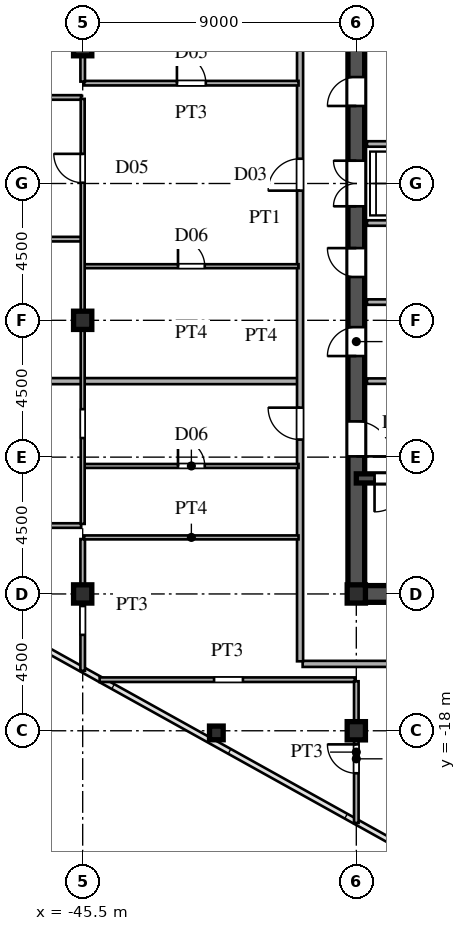
"""IFC4 building model, lengths in metres.
Left out: names, types, materials, properties, quantities, classifications, styles, units other than length and angle.
Written with IfcOpenShell. Run it as: python <this file> out.ifc"""

import sys

from ifc_helpers import new_model, si_unit, direction, frame, frame_2d, origin, origin_2d, place, context, subcontext, project, spatial, rectangle, hollow_rectangle, i_section, extrude, source, transform, mapped, element, fill, save


model = new_model("IFC4")
c1 = context("Model", 3, precision=1e-05, world=origin(), true_north=direction((0.0, 1.0)))
c2 = subcontext(c1, "Body", "Model", "MODEL_VIEW")
j1 = project(units=[si_unit("LENGTHUNIT", "METRE"), si_unit("PLANEANGLEUNIT", "RADIAN")], contexts=[c1])
p1 = place(None, origin())
s1 = spatial("IfcSite", under=j1, at=p1, CompositionType="ELEMENT")
p2 = place(p1, origin())
s2 = spatial("IfcBuilding", under=s1, at=p2, CompositionType="ELEMENT")
p3 = place(p2, frame((0.0, 0.0, 177.9)))
s3 = spatial("IfcBuildingStorey", under=s2, at=p3, CompositionType="ELEMENT", Elevation=177.9)
m1 = source(origin(), c2, "Body", "SweptSolid", [
    extrude(i_section(OverallWidth=0.6, OverallDepth=0.6, WebThickness=0.025, FlangeThickness=0.04, at=origin_2d()), origin(), (0.0, 0.0, 1.0), 3.6),
])
for number, where, z_axis, x_axis in (
    (1, (-36.5, -18.0, 0.0), (0.0, 0.0, 1.0), (1.0, 0.0, 0.0)),
    (2, (-36.5, -13.5, 0.0), (0.0, 0.0, 1.0), (1.0, 0.0, 0.0)),
    (3, (-45.5, -13.5, 0.0), (0.0, 0.0, 1.0), (1.0, 0.0, 0.0)),
    (4, (-45.5, -4.5, 0.0), (0.0, 0.0, 1.0), (1.0, 0.0, 0.0)),
    (5, (-45.5, 4.5, 0.0), (0.0, 0.0, 1.0), (1.0, 0.0, 0.0)),
):
    element("IfcColumn", number, at=place(p3, frame(where, z_axis=z_axis, x_axis=x_axis)), inside=s3, PredefinedType="COLUMN", context=c2, shape_type="MappedRepresentation", body=[
        mapped(m1, transform((0.0, 0.0, 0.0), scale=1.0)),
    ])
m2 = source(origin(), c2, "Body", "SweptSolid", [
    extrude(hollow_rectangle(XDim=0.45, YDim=0.45, WallThickness=0.018, at=origin_2d()), origin(), (0.0, 0.0, 1.0), 3.6),
])
p4 = place(p3, frame((-41.104, -18.071, 0.0), z_axis=(0.0, 0.0, 1.0), x_axis=(1.0, 0.0, 0.0)))
e6 = element("IfcColumn", 6, at=p4, inside=s3, PredefinedType="COLUMN", context=c2, shape_type="MappedRepresentation", body=[
    mapped(m2, transform((0.0, 0.0, 0.0), scale=1.0)),
])
p5 = place(p3, frame((-36.5, -13.5, 0.0), z_axis=(0.0, 0.0, 1.0), x_axis=(1.0, 0.0, 0.0)))
e7 = element("IfcWall", 7, at=p5, inside=s3, PredefinedType="SHEAR", context=c2, shape_type="SweptSolid", body=[
    extrude(rectangle(XDim=9.0, YDim=0.55, at=frame_2d((4.5, 0.0))), origin(), (0.0, 0.0, 1.0), 3.38),
])
p6 = place(p3, frame((-36.5, -13.65, 0.0), z_axis=(0.0, 0.0, 1.0), x_axis=(0.0, 1.0, 0.0)))
e8 = element("IfcWall", 8, at=p6, inside=s3, PredefinedType="SHEAR", context=c2, shape_type="SweptSolid", body=[
    extrude(rectangle(XDim=7.15, YDim=0.55, at=frame_2d((3.575, 0.0))), origin(), (0.0, 0.0, 1.0), 3.38),
])
p7 = place(p6, frame((4.675, 0.0, 0.0)))
e9 = element("IfcOpeningElement", 9, at=p7, cuts=e8, PredefinedType="OPENING", context=c2, shape_type="SweptSolid", body=[
    extrude(rectangle(XDim=1.15, YDim=2.2, at=frame_2d((0.575, 1.1))), frame((0.0, 0.285, 0.0), z_axis=(0.0, -1.0, 0.0), x_axis=(1.0, 0.0, 0.0)), (0.0, 0.0, 1.0), 0.57),
])
p8 = place(p3, frame((-36.5, -1.3, 0.0), z_axis=(0.0, 0.0, 1.0), x_axis=(0.0, 1.0, 0.0)))
e10 = element("IfcWall", 10, at=p8, inside=s3, PredefinedType="SHEAR", context=c2, shape_type="SweptSolid", body=[
    extrude(rectangle(XDim=2.6, YDim=0.55, at=frame_2d((1.3, 0.0))), origin(), (0.0, 0.0, 1.0), 3.38),
])
p9 = place(p8, frame((0.55, 0.0, 0.0)))
e11 = element("IfcOpeningElement", 11, at=p9, cuts=e10, PredefinedType="OPENING", context=c2, shape_type="SweptSolid", body=[
    extrude(rectangle(XDim=1.5, YDim=2.3, at=frame_2d((0.75, 1.15))), frame((0.0, 0.285, 0.0), z_axis=(0.0, -1.0, 0.0), x_axis=(1.0, 0.0, 0.0)), (0.0, 0.0, 1.0), 0.57),
])
p10 = place(p3, frame((-36.5, -6.5, 0.0), z_axis=(0.0, 0.0, 1.0), x_axis=(0.0, 1.0, 0.0)))
e12 = element("IfcWall", 12, at=p10, inside=s3, PredefinedType="SHEAR", context=c2, shape_type="SweptSolid", body=[
    extrude(rectangle(XDim=2.6, YDim=0.55, at=frame_2d((1.3, 0.0))), origin(), (0.0, 0.0, 1.0), 3.38),
])
p11 = place(p10, frame((0.825, 0.0, 0.0)))
e13 = element("IfcOpeningElement", 13, at=p11, cuts=e12, PredefinedType="OPENING", context=c2, shape_type="SweptSolid", body=[
    extrude(rectangle(XDim=0.95, YDim=2.15, at=frame_2d((0.475, 1.075))), frame((0.0, 0.285, 0.0), z_axis=(0.0, -1.0, 0.0), x_axis=(1.0, 0.0, 0.0)), (0.0, 0.0, 1.0), 0.57),
])
p12 = place(p3, frame((-36.5, -3.9, 0.0), z_axis=(0.0, 0.0, 1.0), x_axis=(0.0, 1.0, 0.0)))
e14 = element("IfcWall", 14, at=p12, inside=s3, PredefinedType="SHEAR", context=c2, shape_type="SweptSolid", body=[
    extrude(rectangle(XDim=2.6, YDim=0.55, at=frame_2d((1.3, 0.0))), origin(), (0.0, 0.0, 1.0), 3.38),
])
p13 = place(p12, frame((0.825, 0.0, 0.0)))
e15 = element("IfcOpeningElement", 15, at=p13, cuts=e14, PredefinedType="OPENING", context=c2, shape_type="SweptSolid", body=[
    extrude(rectangle(XDim=0.95, YDim=2.15, at=frame_2d((0.475, 1.075))), frame((0.0, 0.285, 0.0), z_axis=(0.0, -1.0, 0.0), x_axis=(1.0, 0.0, 0.0)), (0.0, 0.0, 1.0), 0.57),
])
p14 = place(p3, frame((-36.5, 1.3, 0.0), z_axis=(0.0, 0.0, 1.0), x_axis=(0.0, 1.0, 0.0)))
e16 = element("IfcWall", 16, at=p14, inside=s3, PredefinedType="SHEAR", context=c2, shape_type="SweptSolid", body=[
    extrude(rectangle(XDim=3.45, YDim=0.55, at=frame_2d((1.725, 0.0))), origin(), (0.0, 0.0, 1.0), 3.38),
])
p15 = place(p14, frame((1.25, 0.0, 0.0)))
e17 = element("IfcOpeningElement", 17, at=p15, cuts=e16, PredefinedType="OPENING", context=c2, shape_type="SweptSolid", body=[
    extrude(rectangle(XDim=0.95, YDim=2.15, at=frame_2d((0.475, 1.075))), frame((0.0, 0.285, 0.0), z_axis=(0.0, -1.0, 0.0), x_axis=(1.0, 0.0, 0.0)), (0.0, 0.0, 1.0), 0.57),
])
p16 = place(p3, frame((-36.5, -9.7, 0.0), z_axis=(0.0, 0.0, 1.0), x_axis=(1.0, 0.0, 0.0)))
e18 = element("IfcWall", 18, at=p16, inside=s3, PredefinedType="SHEAR", context=c2, shape_type="SweptSolid", body=[
    extrude(rectangle(XDim=9.0, YDim=0.3, at=frame_2d((4.5, 0.0))), origin(), (0.0, 0.0, 1.0), 3.38),
])
p17 = place(p16, frame((0.6, 0.0, 0.0)))
e19 = element("IfcOpeningElement", 19, at=p17, cuts=e18, PredefinedType="OPENING", context=c2, shape_type="SweptSolid", body=[
    extrude(rectangle(XDim=1.1, YDim=2.2, at=frame_2d((0.55, 1.1))), frame((0.0, 0.16, 0.0), z_axis=(0.0, -1.0, 0.0), x_axis=(1.0, 0.0, 0.0)), (0.0, 0.0, 1.0), 0.32),
])
p18 = place(p3, frame((-36.15, -6.5, 0.0), z_axis=(0.0, 0.0, 1.0), x_axis=(1.0, 0.0, 0.0)))
e20 = element("IfcWall", 20, at=p18, inside=s3, PredefinedType="PARTITIONING", context=c2, shape_type="SweptSolid", body=[
    extrude(rectangle(XDim=5.7, YDim=0.18, at=frame_2d((2.85, 0.0))), origin(), (0.0, 0.0, 1.0), 3.38),
])
for number, where, z_axis, x_axis in (
    (21, (-36.15, -1.3, 0.0), (0.0, 0.0, 1.0), (1.0, 0.0, 0.0)),
    (22, (-36.15, 1.3, 0.0), (0.0, 0.0, 1.0), (1.0, 0.0, 0.0)),
    (23, (-36.15, -3.9, 0.0), (0.0, 0.0, 1.0), (1.0, 0.0, 0.0)),
):
    element("IfcWall", number, at=place(p3, frame(where, z_axis=z_axis, x_axis=x_axis)), inside=s3, PredefinedType="PARTITIONING", context=c2, shape_type="SweptSolid", body=[
        extrude(rectangle(XDim=2.95, YDim=0.18, at=frame_2d((1.475, 0.0))), origin(), (0.0, 0.0, 1.0), 3.38),
    ])
p19 = place(p3, frame((-44.943, -16.32, 0.0), z_axis=(0.0, 0.0, 1.0), x_axis=(1.0, 0.0, 0.0)))
e24 = element("IfcWall", 24, at=p19, inside=s3, PredefinedType="PARTITIONING", context=c2, shape_type="SweptSolid", body=[
    extrude(rectangle(XDim=8.393, YDim=0.15, at=frame_2d((4.197, 0.0))), origin(), (0.0, 0.0, 1.0), 3.38),
])
p20 = place(p19, frame((3.764, 0.0, 0.0)))
e25 = element("IfcOpeningElement", 25, at=p20, cuts=e24, PredefinedType="OPENING", context=c2, shape_type="SweptSolid", body=[
    extrude(rectangle(XDim=0.95, YDim=2.15, at=frame_2d((0.475, 1.075))), frame((0.0, 0.085, 0.0), z_axis=(0.0, -1.0, 0.0), x_axis=(1.0, 0.0, 0.0)), (0.0, 0.0, 1.0), 0.17),
])
p21 = place(p3, frame((-38.265, -15.8, 0.0), z_axis=(0.0, 0.0, 1.0), x_axis=(1.0, 0.0, 0.0)))
e26 = element("IfcWall", 26, at=p21, inside=s3, PredefinedType="PARTITIONING", context=c2, shape_type="SweptSolid", body=[
    extrude(rectangle(XDim=10.765, YDim=0.2, at=frame_2d((5.382, 0.0))), origin(), (0.0, 0.0, 1.0), 3.38),
])
p22 = place(p3, frame((-45.45, -11.64, 0.0), z_axis=(0.0, 0.0, 1.0), x_axis=(1.0, 0.0, 0.0)))
e27 = element("IfcWall", 27, at=p22, inside=s3, PredefinedType="PARTITIONING", context=c2, shape_type="SweptSolid", body=[
    extrude(rectangle(XDim=7.05, YDim=0.13, at=frame_2d((3.525, 0.0))), origin(), (0.0, 0.0, 1.0), 3.38),
])
p23 = place(p3, frame((-53.983, -11.25, 0.0), z_axis=(0.0, 0.0, 1.0), x_axis=(1.0, 0.0, 0.0)))
e28 = element("IfcWall", 28, at=p23, inside=s3, PredefinedType="PARTITIONING", context=c2, shape_type="SweptSolid", body=[
    extrude(rectangle(XDim=8.433, YDim=0.15, at=frame_2d((4.216, 0.0))), origin(), (0.0, 0.0, 1.0), 3.38),
])
p24 = place(p23, frame((3.741, 0.0, 0.0)))
e29 = element("IfcOpeningElement", 29, at=p24, cuts=e28, PredefinedType="OPENING", context=c2, shape_type="SweptSolid", body=[
    extrude(rectangle(XDim=0.95, YDim=2.15, at=frame_2d((0.475, 1.075))), frame((0.0, 0.085, 0.0), z_axis=(0.0, -1.0, 0.0), x_axis=(1.0, 0.0, 0.0)), (0.0, 0.0, 1.0), 0.17),
])
p25 = place(p3, frame((-45.45, -9.29, 0.0), z_axis=(0.0, 0.0, 1.0), x_axis=(1.0, 0.0, 0.0)))
e30 = element("IfcWall", 30, at=p25, inside=s3, PredefinedType="PARTITIONING", context=c2, shape_type="SweptSolid", body=[
    extrude(rectangle(XDim=7.05, YDim=0.13, at=frame_2d((3.525, 0.0))), origin(), (0.0, 0.0, 1.0), 3.38),
])
p26 = place(p25, frame((3.085, 0.0, 0.0)))
e31 = element("IfcOpeningElement", 31, at=p26, cuts=e30, PredefinedType="OPENING", context=c2, shape_type="SweptSolid", body=[
    extrude(rectangle(XDim=0.88, YDim=2.1, at=frame_2d((0.44, 1.05))), frame((0.0, 0.075, 0.0), z_axis=(0.0, -1.0, 0.0), x_axis=(1.0, 0.0, 0.0)), (0.0, 0.0, 1.0), 0.15),
])
p27 = place(p3, frame((-62.577, -6.5, 0.0), z_axis=(0.0, 0.0, 1.0), x_axis=(1.0, 0.0, 0.0)))
e32 = element("IfcWall", 32, at=p27, inside=s3, PredefinedType="PARTITIONING", context=c2, shape_type="SweptSolid", body=[
    extrude(rectangle(XDim=24.147, YDim=0.2, at=frame_2d((12.073, 0.0))), origin(), (0.0, 0.0, 1.0), 3.38),
])
p28 = place(p3, frame((-45.45, -2.72, 0.0), z_axis=(0.0, 0.0, 1.0), x_axis=(1.0, 0.0, 0.0)))
e33 = element("IfcWall", 33, at=p28, inside=s3, PredefinedType="PARTITIONING", context=c2, shape_type="SweptSolid", body=[
    extrude(rectangle(XDim=7.05, YDim=0.13, at=frame_2d((3.525, 0.0))), origin(), (0.0, 0.0, 1.0), 3.38),
])
p29 = place(p28, frame((3.085, 0.0, 0.0)))
e34 = element("IfcOpeningElement", 34, at=p29, cuts=e33, PredefinedType="OPENING", context=c2, shape_type="SweptSolid", body=[
    extrude(rectangle(XDim=0.88, YDim=2.1, at=frame_2d((0.44, 1.05))), frame((0.0, 0.075, 0.0), z_axis=(0.0, -1.0, 0.0), x_axis=(1.0, 0.0, 0.0)), (0.0, 0.0, 1.0), 0.15),
])
p30 = place(p3, frame((-68.535, -1.83, 0.0), z_axis=(0.0, 0.0, 1.0), x_axis=(1.0, 0.0, 0.0)))
e35 = element("IfcWall", 35, at=p30, inside=s3, PredefinedType="PARTITIONING", context=c2, shape_type="SweptSolid", body=[
    extrude(rectangle(XDim=22.985, YDim=0.15, at=frame_2d((11.492, 0.0))), origin(), (0.0, 0.0, 1.0), 3.38),
])
p31 = place(p30, frame((18.06, 0.0, 0.0)))
e36 = element("IfcOpeningElement", 36, at=p31, cuts=e35, PredefinedType="OPENING", context=c2, shape_type="SweptSolid", body=[
    extrude(rectangle(XDim=0.95, YDim=2.15, at=frame_2d((0.475, 1.075))), frame((0.0, 0.085, 0.0), z_axis=(0.0, -1.0, 0.0), x_axis=(1.0, 0.0, 0.0)), (0.0, 0.0, 1.0), 0.17),
])
p32 = place(p30, frame((10.71, 0.0, 0.0)))
e37 = element("IfcOpeningElement", 37, at=p32, cuts=e35, PredefinedType="OPENING", context=c2, shape_type="SweptSolid", body=[
    extrude(rectangle(XDim=0.95, YDim=2.15, at=frame_2d((0.475, 1.075))), frame((0.0, 0.085, 0.0), z_axis=(0.0, -1.0, 0.0), x_axis=(1.0, 0.0, 0.0)), (0.0, 0.0, 1.0), 0.17),
])
p33 = place(p3, frame((-68.375, 2.83, 0.0), z_axis=(0.0, 0.0, 1.0), x_axis=(1.0, 0.0, 0.0)))
e38 = element("IfcWall", 38, at=p33, inside=s3, PredefinedType="PARTITIONING", context=c2, shape_type="SweptSolid", body=[
    extrude(rectangle(XDim=22.825, YDim=0.15, at=frame_2d((11.413, 0.0))), origin(), (0.0, 0.0, 1.0), 3.38),
])
p34 = place(p33, frame((17.9, 0.0, 0.0)))
e39 = element("IfcOpeningElement", 39, at=p34, cuts=e38, PredefinedType="OPENING", context=c2, shape_type="SweptSolid", body=[
    extrude(rectangle(XDim=0.95, YDim=2.15, at=frame_2d((0.475, 1.075))), frame((0.0, 0.085, 0.0), z_axis=(0.0, -1.0, 0.0), x_axis=(1.0, 0.0, 0.0)), (0.0, 0.0, 1.0), 0.17),
])
p35 = place(p33, frame((10.55, 0.0, 0.0)))
e40 = element("IfcOpeningElement", 40, at=p35, cuts=e38, PredefinedType="OPENING", context=c2, shape_type="SweptSolid", body=[
    extrude(rectangle(XDim=0.95, YDim=2.15, at=frame_2d((0.475, 1.075))), frame((0.0, 0.085, 0.0), z_axis=(0.0, -1.0, 0.0), x_axis=(1.0, 0.0, 0.0)), (0.0, 0.0, 1.0), 0.17),
])
p36 = place(p3, frame((-45.45, 3.3, 0.0), z_axis=(0.0, 0.0, 1.0), x_axis=(1.0, 0.0, 0.0)))
e41 = element("IfcWall", 41, at=p36, inside=s3, PredefinedType="PARTITIONING", context=c2, shape_type="SweptSolid", body=[
    extrude(rectangle(XDim=7.05, YDim=0.15, at=frame_2d((3.525, 0.0))), origin(), (0.0, 0.0, 1.0), 3.38),
])
p37 = place(p36, frame((3.05, 0.0, 0.0)))
e42 = element("IfcOpeningElement", 42, at=p37, cuts=e41, PredefinedType="OPENING", context=c2, shape_type="SweptSolid", body=[
    extrude(rectangle(XDim=0.95, YDim=2.15, at=frame_2d((0.475, 1.075))), frame((0.0, 0.085, 0.0), z_axis=(0.0, -1.0, 0.0), x_axis=(1.0, 0.0, 0.0)), (0.0, 0.0, 1.0), 0.17),
])
p38 = place(p3, frame((-45.5, -16.027, 0.0), z_axis=(0.0, 0.0, 1.0), x_axis=(0.0, 1.0, 0.0)))
e43 = element("IfcWall", 43, at=p38, inside=s3, PredefinedType="PARTITIONING", context=c2, shape_type="SweptSolid", body=[
    extrude(rectangle(XDim=4.332, YDim=0.15, at=frame_2d((2.166, 0.0))), origin(), (0.0, 0.0, 1.0), 2.78),
])
p39 = place(p38, frame((1.181, 0.0, 0.0)))
e44 = element("IfcOpeningElement", 44, at=p39, cuts=e43, PredefinedType="OPENING", context=c2, shape_type="SweptSolid", body=[
    extrude(rectangle(XDim=0.95, YDim=2.15, at=frame_2d((0.475, 1.075))), frame((0.0, 0.085, 0.0), z_axis=(0.0, -1.0, 0.0), x_axis=(1.0, 0.0, 0.0)), (0.0, 0.0, 1.0), 0.17),
])
p40 = place(p3, frame((-45.5, -11.196, 0.0), z_axis=(0.0, 0.0, 1.0), x_axis=(0.0, 1.0, 0.0)))
e45 = element("IfcWall", 45, at=p40, inside=s3, PredefinedType="PARTITIONING", context=c2, shape_type="SweptSolid", body=[
    extrude(rectangle(XDim=13.979, YDim=0.13, at=frame_2d((6.99, 0.0))), origin(), (0.0, 0.0, 1.0), 2.78),
])
p41 = place(p40, frame((2.823, 0.0, 0.0)))
e46 = element("IfcOpeningElement", 46, at=p41, cuts=e45, PredefinedType="OPENING", context=c2, shape_type="SweptSolid", body=[
    extrude(rectangle(XDim=0.95, YDim=2.15, at=frame_2d((0.475, 1.075))), frame((0.0, 0.075, 0.0), z_axis=(0.0, -1.0, 0.0), x_axis=(1.0, 0.0, 0.0)), (0.0, 0.0, 1.0), 0.15),
])
p42 = place(p40, frame((11.221, 0.0, 0.0)))
e47 = element("IfcOpeningElement", 47, at=p42, cuts=e45, PredefinedType="OPENING", context=c2, shape_type="SweptSolid", body=[
    extrude(rectangle(XDim=0.95, YDim=2.15, at=frame_2d((0.475, 1.075))), frame((0.0, 0.075, 0.0), z_axis=(0.0, -1.0, 0.0), x_axis=(1.0, 0.0, 0.0)), (0.0, 0.0, 1.0), 0.15),
])
p43 = place(p3, frame((-45.5, 3.352, 0.0), z_axis=(0.0, 0.0, 1.0), x_axis=(0.0, 1.0, 0.0)))
e48 = element("IfcWall", 48, at=p43, inside=s3, PredefinedType="PARTITIONING", context=c2, shape_type="SweptSolid", body=[
    extrude(rectangle(XDim=4.098, YDim=0.15, at=frame_2d((2.049, 0.0))), origin(), (0.0, 0.0, 1.0), 2.78),
])
p44 = place(p3, frame((-38.35, -15.715, 0.0), z_axis=(0.0, 0.0, 1.0), x_axis=(0.0, 1.0, 0.0)))
e49 = element("IfcWall", 49, at=p44, inside=s3, PredefinedType="PARTITIONING", context=c2, shape_type="SweptSolid", body=[
    extrude(rectangle(XDim=31.43, YDim=0.2, at=frame_2d((15.715, 0.0))), origin(), (0.0, 0.0, 1.0), 3.38),
])
p45 = place(p44, frame((7.292, 0.0, 0.0)))
e50 = element("IfcOpeningElement", 50, at=p45, cuts=e49, PredefinedType="OPENING", context=c2, shape_type="SweptSolid", body=[
    extrude(rectangle(XDim=1.05, YDim=2.25, at=frame_2d((0.525, 1.125))), frame((0.0, 0.11, 0.0), z_axis=(0.0, -1.0, 0.0), x_axis=(1.0, 0.0, 0.0)), (0.0, 0.0, 1.0), 0.22),
])
p46 = place(p44, frame((15.48, 0.0, 0.0)))
e51 = element("IfcOpeningElement", 51, at=p46, cuts=e49, PredefinedType="OPENING", context=c2, shape_type="SweptSolid", body=[
    extrude(rectangle(XDim=1.05, YDim=2.25, at=frame_2d((0.525, 1.125))), frame((0.0, 0.11, 0.0), z_axis=(0.0, -1.0, 0.0), x_axis=(1.0, 0.0, 0.0)), (0.0, 0.0, 1.0), 0.22),
])
p47 = place(p44, frame((26.84, 0.0, 0.0)))
e52 = element("IfcOpeningElement", 52, at=p47, cuts=e49, PredefinedType="OPENING", context=c2, shape_type="SweptSolid", body=[
    extrude(rectangle(XDim=1.05, YDim=2.25, at=frame_2d((0.525, 1.125))), frame((0.0, 0.11, 0.0), z_axis=(0.0, -1.0, 0.0), x_axis=(1.0, 0.0, 0.0)), (0.0, 0.0, 1.0), 0.22),
])
p48 = place(p3, frame((-36.5, -21.032, 0.0), z_axis=(0.0, 0.0, 1.0), x_axis=(0.0, 1.0, 0.0)))
e53 = element("IfcWall", 53, at=p48, inside=s3, PredefinedType="PARTITIONING", context=c2, shape_type="SweptSolid", body=[
    extrude(rectangle(XDim=4.661, YDim=0.15, at=frame_2d((2.331, 0.0))), origin(), (0.0, 0.0, 1.0), 2.78),
])
p49 = place(p48, frame((1.634, 0.0, 0.0)))
e54 = element("IfcOpeningElement", 54, at=p49, cuts=e53, PredefinedType="OPENING", context=c2, shape_type="SweptSolid", body=[
    extrude(rectangle(XDim=0.95, YDim=2.15, at=frame_2d((0.475, 1.075))), frame((0.0, 0.085, 0.0), z_axis=(0.0, -1.0, 0.0), x_axis=(1.0, 0.0, 0.0)), (0.0, 0.0, 1.0), 0.17),
])
m3 = source(origin(), c2, "Body", "SweptSolid", [
    extrude(rectangle(XDim=1.15, YDim=2.2, at=frame_2d((0.575, 1.1))), frame((0.0, 0.025, 0.0), z_axis=(0.0, -1.0, 0.0), x_axis=(1.0, 0.0, 0.0)), (0.0, 0.0, 1.0), 0.05),
])
p50 = place(p7, frame((1.15, 0.0, 0.0), z_axis=(0.0, 0.0, 1.0), x_axis=(-1.0, 0.0, 0.0)))
e55 = element("IfcDoor", 55, at=p50, inside=s3, OperationType="SINGLE_SWING_LEFT", PredefinedType="DOOR", context=c2, shape_type="MappedRepresentation", body=[
    mapped(m3, transform((0.0, 0.0, 0.0), scale=1.0)),
])
fill(e9, e55)
m4 = source(origin(), c2, "Body", "SweptSolid", [
    extrude(rectangle(XDim=1.5, YDim=2.3, at=frame_2d((0.75, 1.15))), frame((0.0, 0.025, 0.0), z_axis=(0.0, -1.0, 0.0), x_axis=(1.0, 0.0, 0.0)), (0.0, 0.0, 1.0), 0.05),
])
p51 = place(p9, origin())
e56 = element("IfcDoor", 56, at=p51, inside=s3, OperationType="DOUBLE_SWING_LEFT", PredefinedType="DOOR", context=c2, shape_type="MappedRepresentation", body=[
    mapped(m4, transform((0.0, 0.0, 0.0), scale=1.0)),
])
fill(e11, e56)
m5 = source(origin(), c2, "Body", "SweptSolid", [
    extrude(rectangle(XDim=0.95, YDim=2.15, at=frame_2d((0.475, 1.075))), frame((0.0, 0.025, 0.0), z_axis=(0.0, -1.0, 0.0), x_axis=(1.0, 0.0, 0.0)), (0.0, 0.0, 1.0), 0.05),
])
p52 = place(p11, origin())
e57 = element("IfcDoor", 57, at=p52, inside=s3, OperationType="SINGLE_SWING_LEFT", PredefinedType="DOOR", context=c2, shape_type="MappedRepresentation", body=[
    mapped(m5, transform((0.0, 0.0, 0.0), scale=1.0)),
])
fill(e13, e57)
p53 = place(p13, origin())
e58 = element("IfcDoor", 58, at=p53, inside=s3, OperationType="SINGLE_SWING_RIGHT", PredefinedType="DOOR", context=c2, shape_type="MappedRepresentation", body=[
    mapped(m5, transform((0.0, 0.0, 0.0), scale=1.0)),
])
fill(e15, e58)
p54 = place(p15, origin())
e59 = element("IfcDoor", 59, at=p54, inside=s3, OperationType="SINGLE_SWING_LEFT", PredefinedType="DOOR", context=c2, shape_type="MappedRepresentation", body=[
    mapped(m5, transform((0.0, 0.0, 0.0), scale=1.0)),
])
fill(e17, e59)
m6 = source(origin(), c2, "Body", "SweptSolid", [
    extrude(rectangle(XDim=1.1, YDim=2.2, at=frame_2d((0.55, 1.1))), frame((0.0, 0.025, 0.0), z_axis=(0.0, -1.0, 0.0), x_axis=(1.0, 0.0, 0.0)), (0.0, 0.0, 1.0), 0.05),
])
p55 = place(p17, frame((1.1, 0.0, 0.0), z_axis=(0.0, 0.0, 1.0), x_axis=(-1.0, 0.0, 0.0)))
e60 = element("IfcDoor", 60, at=p55, inside=s3, OperationType="SINGLE_SWING_LEFT", PredefinedType="DOOR", context=c2, shape_type="MappedRepresentation", body=[
    mapped(m6, transform((0.0, 0.0, 0.0), scale=1.0)),
])
fill(e19, e60)
m7 = source(origin(), c2, "Body", "SweptSolid", [
    extrude(rectangle(XDim=0.88, YDim=2.1, at=frame_2d((0.44, 1.05))), frame((0.0, 0.025, 0.0), z_axis=(0.0, -1.0, 0.0), x_axis=(1.0, 0.0, 0.0)), (0.0, 0.0, 1.0), 0.05),
])
p56 = place(p26, origin())
e61 = element("IfcDoor", 61, at=p56, inside=s3, OperationType="SINGLE_SWING_LEFT", PredefinedType="DOOR", context=c2, shape_type="MappedRepresentation", body=[
    mapped(m7, transform((0.0, 0.0, 0.0), scale=1.0)),
])
fill(e31, e61)
p57 = place(p29, origin())
e62 = element("IfcDoor", 62, at=p57, inside=s3, OperationType="SINGLE_SWING_LEFT", PredefinedType="DOOR", context=c2, shape_type="MappedRepresentation", body=[
    mapped(m7, transform((0.0, 0.0, 0.0), scale=1.0)),
])
fill(e34, e62)
m8 = source(origin(), c2, "Body", "SweptSolid", [
    extrude(rectangle(XDim=0.95, YDim=2.15, at=frame_2d((0.475, 1.075))), frame((0.0, 0.025, 0.0), z_axis=(0.0, -1.0, 0.0), x_axis=(1.0, 0.0, 0.0)), (0.0, 0.0, 1.0), 0.05),
])
p58 = place(p37, origin())
e63 = element("IfcDoor", 63, at=p58, inside=s3, OperationType="SINGLE_SWING_LEFT", PredefinedType="DOOR", context=c2, shape_type="MappedRepresentation", body=[
    mapped(m8, transform((0.0, 0.0, 0.0), scale=1.0)),
])
fill(e42, e63)
p59 = place(p42, origin())
e64 = element("IfcDoor", 64, at=p59, inside=s3, OperationType="SINGLE_SWING_RIGHT", PredefinedType="DOOR", context=c2, shape_type="MappedRepresentation", body=[
    mapped(m8, transform((0.0, 0.0, 0.0), scale=1.0)),
])
fill(e47, e64)
m9 = source(origin(), c2, "Body", "SweptSolid", [
    extrude(rectangle(XDim=1.05, YDim=2.25, at=frame_2d((0.525, 1.125))), frame((0.0, 0.025, 0.0), z_axis=(0.0, -1.0, 0.0), x_axis=(1.0, 0.0, 0.0)), (0.0, 0.0, 1.0), 0.05),
])
p60 = place(p45, origin())
e65 = element("IfcDoor", 65, at=p60, inside=s3, OperationType="SINGLE_SWING_RIGHT", PredefinedType="DOOR", context=c2, shape_type="MappedRepresentation", body=[
    mapped(m9, transform((0.0, 0.0, 0.0), scale=1.0)),
])
fill(e50, e65)
p61 = place(p46, origin())
e66 = element("IfcDoor", 66, at=p61, inside=s3, OperationType="SINGLE_SWING_LEFT", PredefinedType="DOOR", context=c2, shape_type="MappedRepresentation", body=[
    mapped(m9, transform((0.0, 0.0, 0.0), scale=1.0)),
])
fill(e51, e66)
p62 = place(p49, origin())
e67 = element("IfcDoor", 67, at=p62, inside=s3, OperationType="SINGLE_SWING_RIGHT", PredefinedType="DOOR", context=c2, shape_type="MappedRepresentation", body=[
    mapped(m8, transform((0.0, 0.0, 0.0), scale=1.0)),
])
fill(e54, e67)
save(model, sys.argv[1])
